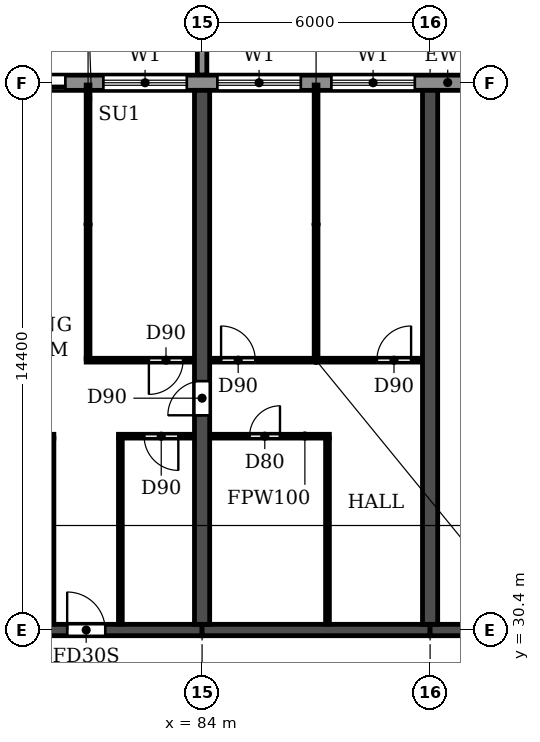
"""IFC4 building model, lengths in metres.
Left out: names, types, materials, properties, quantities, classifications, styles, units other than length and angle.
Written with IfcOpenShell. Run it as: python <this file> out.ifc"""

import sys

from ifc_helpers import new_model, si_unit, direction, frame, frame_2d, origin, place, context, subcontext, project, spatial, polyline, rectangle, outline, extrude, source, transform, mapped, element, fill, save


model = new_model("IFC4")
c1 = context("Model", 3, precision=1e-05, world=origin(), true_north=direction((0.0, 1.0)))
c2 = subcontext(c1, "Body", "Model", "MODEL_VIEW")
j1 = project(units=[si_unit("LENGTHUNIT", "METRE"), si_unit("PLANEANGLEUNIT", "RADIAN")], contexts=[c1])
p1 = place(None, origin())
s1 = spatial("IfcSite", under=j1, at=p1, CompositionType="ELEMENT")
p2 = place(p1, origin())
s2 = spatial("IfcBuilding", under=s1, at=p2, CompositionType="ELEMENT")
p3 = place(p2, frame((0.0, 0.0, 63.0)))
s3 = spatial("IfcBuildingStorey", under=s2, at=p3, CompositionType="ELEMENT", Elevation=63.0)
p4 = place(p3, frame((84.0, 30.55, 0.0), z_axis=(0.0, 0.0, 1.0), x_axis=(0.0, 1.0, 0.0)))
e1 = element("IfcWall", 1, at=p4, inside=s3, PredefinedType="SHEAR", context=c2, shape_type="SweptSolid", body=[
    extrude(rectangle(XDim=14.05, YDim=0.4, at=frame_2d((7.025, 0.0))), origin(), (0.0, 0.0, 1.0), 2.95),
])
p5 = place(p4, frame((5.5, 0.0, 0.0)))
e2 = element("IfcOpeningElement", 2, at=p5, cuts=e1, PredefinedType="OPENING", context=c2, shape_type="SweptSolid", body=[
    extrude(rectangle(XDim=0.9, YDim=2.1, at=frame_2d((0.45, 1.05))), frame((0.0, 0.21, 0.0), z_axis=(0.0, -1.0, 0.0), x_axis=(1.0, 0.0, 0.0)), (0.0, 0.0, 1.0), 0.42),
])
p6 = place(p3, frame((90.0, 30.55, 0.0), z_axis=(0.0, 0.0, 1.0), x_axis=(0.0, 1.0, 0.0)))
e3 = element("IfcWall", 3, at=p6, inside=s3, PredefinedType="SHEAR", context=c2, shape_type="SweptSolid", body=[
    extrude(rectangle(XDim=14.05, YDim=0.4, at=frame_2d((7.025, 0.0))), origin(), (0.0, 0.0, 1.0), 2.95),
])
p7 = place(p3, frame((78.0, 30.4, 0.0), z_axis=(0.0, 0.0, 1.0), x_axis=(1.0, 0.0, 0.0)))
e4 = element("IfcWall", 4, at=p7, inside=s3, PredefinedType="SHEAR", context=c2, shape_type="SweptSolid", body=[
    extrude(rectangle(XDim=6.0, YDim=0.3, at=frame_2d((3.0, 0.0))), origin(), (0.0, 0.0, 1.0), 2.35),
])
p8 = place(p7, frame((2.45, 0.0, 0.0)))
e5 = element("IfcOpeningElement", 5, at=p8, cuts=e4, PredefinedType="OPENING", context=c2, shape_type="SweptSolid", body=[
    extrude(rectangle(XDim=1.0, YDim=2.1, at=frame_2d((0.5, 1.05))), frame((0.0, 0.16, 0.0), z_axis=(0.0, -1.0, 0.0), x_axis=(1.0, 0.0, 0.0)), (0.0, 0.0, 1.0), 0.32),
])
p9 = place(p3, frame((84.0, 30.4, 0.0), z_axis=(0.0, 0.0, 1.0), x_axis=(1.0, 0.0, 0.0)))
e6 = element("IfcWall", 6, at=p9, inside=s3, PredefinedType="SHEAR", context=c2, shape_type="SweptSolid", body=[
    extrude(rectangle(XDim=6.0, YDim=0.3, at=frame_2d((3.0, 0.0))), origin(), (0.0, 0.0, 1.0), 2.35),
])
p10 = place(p3, frame((90.0, 30.4, 0.0), z_axis=(0.0, 0.0, 1.0), x_axis=(1.0, 0.0, 0.0)))
e7 = element("IfcWall", 7, at=p10, inside=s3, PredefinedType="SHEAR", context=c2, shape_type="SweptSolid", body=[
    extrude(rectangle(XDim=5.8, YDim=0.3, at=frame_2d((2.9, 0.0))), origin(), (0.0, 0.0, 1.0), 2.35),
])
p11 = place(p10, frame((2.5, 0.0, 0.0)))
e8 = element("IfcOpeningElement", 8, at=p11, cuts=e7, PredefinedType="OPENING", context=c2, shape_type="SweptSolid", body=[
    extrude(rectangle(XDim=1.0, YDim=2.1, at=frame_2d((0.5, 1.05))), frame((0.0, 0.16, 0.0), z_axis=(0.0, -1.0, 0.0), x_axis=(1.0, 0.0, 0.0)), (0.0, 0.0, 1.0), 0.32),
])
p12 = place(p3, frame((91.317, 44.8, 0.0), z_axis=(0.0, 0.0, 1.0), x_axis=(-1.0, 0.0, 0.0)))
e9 = element("IfcWall", 9, at=p12, inside=s3, PredefinedType="STANDARD", context=c2, shape_type="SweptSolid", body=[
    extrude(rectangle(XDim=80.634, YDim=0.4, at=frame_2d((40.317, 0.0))), origin(), (0.0, 0.0, 1.0), 2.95),
])
p13 = place(p12, frame((76.717, 0.0, 0.9)))
e10 = element("IfcOpeningElement", 10, at=p13, cuts=e9, PredefinedType="OPENING", context=c2, shape_type="SweptSolid", body=[
    extrude(rectangle(XDim=2.2, YDim=1.5, at=frame_2d((1.1, 0.75))), frame((0.0, 0.21, 0.0), z_axis=(0.0, -1.0, 0.0), x_axis=(1.0, 0.0, 0.0)), (0.0, 0.0, 1.0), 0.42),
])
p14 = place(p12, frame((73.917, 0.0, 0.0)))
e11 = element("IfcOpeningElement", 11, at=p14, cuts=e9, PredefinedType="OPENING", context=c2, shape_type="SweptSolid", body=[
    extrude(rectangle(XDim=1.8, YDim=2.4, at=frame_2d((0.9, 1.2))), frame((0.0, 0.21, 0.0), z_axis=(0.0, -1.0, 0.0), x_axis=(1.0, 0.0, 0.0)), (0.0, 0.0, 1.0), 0.42),
])
p15 = place(p12, frame((70.717, 0.0, 0.9)))
e12 = element("IfcOpeningElement", 12, at=p15, cuts=e9, PredefinedType="OPENING", context=c2, shape_type="SweptSolid", body=[
    extrude(rectangle(XDim=2.2, YDim=1.5, at=frame_2d((1.1, 0.75))), frame((0.0, 0.21, 0.0), z_axis=(0.0, -1.0, 0.0), x_axis=(1.0, 0.0, 0.0)), (0.0, 0.0, 1.0), 0.42),
])
p16 = place(p12, frame((67.917, 0.0, 0.0)))
e13 = element("IfcOpeningElement", 13, at=p16, cuts=e9, PredefinedType="OPENING", context=c2, shape_type="SweptSolid", body=[
    extrude(rectangle(XDim=1.8, YDim=2.4, at=frame_2d((0.9, 1.2))), frame((0.0, 0.21, 0.0), z_axis=(0.0, -1.0, 0.0), x_axis=(1.0, 0.0, 0.0)), (0.0, 0.0, 1.0), 0.42),
])
p17 = place(p12, frame((64.717, 0.0, 0.9)))
e14 = element("IfcOpeningElement", 14, at=p17, cuts=e9, PredefinedType="OPENING", context=c2, shape_type="SweptSolid", body=[
    extrude(rectangle(XDim=2.2, YDim=1.5, at=frame_2d((1.1, 0.75))), frame((0.0, 0.21, 0.0), z_axis=(0.0, -1.0, 0.0), x_axis=(1.0, 0.0, 0.0)), (0.0, 0.0, 1.0), 0.42),
])
p18 = place(p12, frame((61.917, 0.0, 0.0)))
e15 = element("IfcOpeningElement", 15, at=p18, cuts=e9, PredefinedType="OPENING", context=c2, shape_type="SweptSolid", body=[
    extrude(rectangle(XDim=1.8, YDim=2.4, at=frame_2d((0.9, 1.2))), frame((0.0, 0.21, 0.0), z_axis=(0.0, -1.0, 0.0), x_axis=(1.0, 0.0, 0.0)), (0.0, 0.0, 1.0), 0.42),
])
p19 = place(p12, frame((58.717, 0.0, 0.9)))
e16 = element("IfcOpeningElement", 16, at=p19, cuts=e9, PredefinedType="OPENING", context=c2, shape_type="SweptSolid", body=[
    extrude(rectangle(XDim=2.2, YDim=1.5, at=frame_2d((1.1, 0.75))), frame((0.0, 0.21, 0.0), z_axis=(0.0, -1.0, 0.0), x_axis=(1.0, 0.0, 0.0)), (0.0, 0.0, 1.0), 0.42),
])
p20 = place(p12, frame((55.717, 0.0, 0.9)))
e17 = element("IfcOpeningElement", 17, at=p20, cuts=e9, PredefinedType="OPENING", context=c2, shape_type="SweptSolid", body=[
    extrude(rectangle(XDim=2.2, YDim=1.5, at=frame_2d((1.1, 0.75))), frame((0.0, 0.21, 0.0), z_axis=(0.0, -1.0, 0.0), x_axis=(1.0, 0.0, 0.0)), (0.0, 0.0, 1.0), 0.42),
])
p21 = place(p12, frame((52.917, 0.0, 0.0)))
e18 = element("IfcOpeningElement", 18, at=p21, cuts=e9, PredefinedType="OPENING", context=c2, shape_type="SweptSolid", body=[
    extrude(rectangle(XDim=1.8, YDim=2.4, at=frame_2d((0.9, 1.2))), frame((0.0, 0.21, 0.0), z_axis=(0.0, -1.0, 0.0), x_axis=(1.0, 0.0, 0.0)), (0.0, 0.0, 1.0), 0.42),
])
p22 = place(p12, frame((49.717, 0.0, 0.9)))
e19 = element("IfcOpeningElement", 19, at=p22, cuts=e9, PredefinedType="OPENING", context=c2, shape_type="SweptSolid", body=[
    extrude(rectangle(XDim=2.2, YDim=1.5, at=frame_2d((1.1, 0.75))), frame((0.0, 0.21, 0.0), z_axis=(0.0, -1.0, 0.0), x_axis=(1.0, 0.0, 0.0)), (0.0, 0.0, 1.0), 0.42),
])
p23 = place(p12, frame((46.917, 0.0, 0.0)))
e20 = element("IfcOpeningElement", 20, at=p23, cuts=e9, PredefinedType="OPENING", context=c2, shape_type="SweptSolid", body=[
    extrude(rectangle(XDim=1.8, YDim=2.4, at=frame_2d((0.9, 1.2))), frame((0.0, 0.21, 0.0), z_axis=(0.0, -1.0, 0.0), x_axis=(1.0, 0.0, 0.0)), (0.0, 0.0, 1.0), 0.42),
])
p24 = place(p12, frame((43.717, 0.0, 0.9)))
e21 = element("IfcOpeningElement", 21, at=p24, cuts=e9, PredefinedType="OPENING", context=c2, shape_type="SweptSolid", body=[
    extrude(rectangle(XDim=2.2, YDim=1.5, at=frame_2d((1.1, 0.75))), frame((0.0, 0.21, 0.0), z_axis=(0.0, -1.0, 0.0), x_axis=(1.0, 0.0, 0.0)), (0.0, 0.0, 1.0), 0.42),
])
p25 = place(p12, frame((40.717, 0.0, 0.9)))
e22 = element("IfcOpeningElement", 22, at=p25, cuts=e9, PredefinedType="OPENING", context=c2, shape_type="SweptSolid", body=[
    extrude(rectangle(XDim=2.2, YDim=1.5, at=frame_2d((1.1, 0.75))), frame((0.0, 0.21, 0.0), z_axis=(0.0, -1.0, 0.0), x_axis=(1.0, 0.0, 0.0)), (0.0, 0.0, 1.0), 0.42),
])
p26 = place(p12, frame((37.717, 0.0, 0.9)))
e23 = element("IfcOpeningElement", 23, at=p26, cuts=e9, PredefinedType="OPENING", context=c2, shape_type="SweptSolid", body=[
    extrude(rectangle(XDim=2.2, YDim=1.5, at=frame_2d((1.1, 0.75))), frame((0.0, 0.21, 0.0), z_axis=(0.0, -1.0, 0.0), x_axis=(1.0, 0.0, 0.0)), (0.0, 0.0, 1.0), 0.42),
])
p27 = place(p12, frame((34.717, 0.0, 0.9)))
e24 = element("IfcOpeningElement", 24, at=p27, cuts=e9, PredefinedType="OPENING", context=c2, shape_type="SweptSolid", body=[
    extrude(rectangle(XDim=2.2, YDim=1.5, at=frame_2d((1.1, 0.75))), frame((0.0, 0.21, 0.0), z_axis=(0.0, -1.0, 0.0), x_axis=(1.0, 0.0, 0.0)), (0.0, 0.0, 1.0), 0.42),
])
p28 = place(p12, frame((31.917, 0.0, 0.0)))
e25 = element("IfcOpeningElement", 25, at=p28, cuts=e9, PredefinedType="OPENING", context=c2, shape_type="SweptSolid", body=[
    extrude(rectangle(XDim=1.8, YDim=2.4, at=frame_2d((0.9, 1.2))), frame((0.0, 0.21, 0.0), z_axis=(0.0, -1.0, 0.0), x_axis=(1.0, 0.0, 0.0)), (0.0, 0.0, 1.0), 0.42),
])
p29 = place(p12, frame((28.917, 0.0, 0.0)))
e26 = element("IfcOpeningElement", 26, at=p29, cuts=e9, PredefinedType="OPENING", context=c2, shape_type="SweptSolid", body=[
    extrude(rectangle(XDim=1.8, YDim=2.4, at=frame_2d((0.9, 1.2))), frame((0.0, 0.21, 0.0), z_axis=(0.0, -1.0, 0.0), x_axis=(1.0, 0.0, 0.0)), (0.0, 0.0, 1.0), 0.42),
])
p30 = place(p12, frame((25.717, 0.0, 0.9)))
e27 = element("IfcOpeningElement", 27, at=p30, cuts=e9, PredefinedType="OPENING", context=c2, shape_type="SweptSolid", body=[
    extrude(rectangle(XDim=2.2, YDim=1.5, at=frame_2d((1.1, 0.75))), frame((0.0, 0.21, 0.0), z_axis=(0.0, -1.0, 0.0), x_axis=(1.0, 0.0, 0.0)), (0.0, 0.0, 1.0), 0.42),
])
p31 = place(p12, frame((22.917, 0.0, 0.0)))
e28 = element("IfcOpeningElement", 28, at=p31, cuts=e9, PredefinedType="OPENING", context=c2, shape_type="SweptSolid", body=[
    extrude(rectangle(XDim=1.8, YDim=2.4, at=frame_2d((0.9, 1.2))), frame((0.0, 0.21, 0.0), z_axis=(0.0, -1.0, 0.0), x_axis=(1.0, 0.0, 0.0)), (0.0, 0.0, 1.0), 0.42),
])
p32 = place(p12, frame((19.717, 0.0, 0.9)))
e29 = element("IfcOpeningElement", 29, at=p32, cuts=e9, PredefinedType="OPENING", context=c2, shape_type="SweptSolid", body=[
    extrude(rectangle(XDim=2.2, YDim=1.5, at=frame_2d((1.1, 0.75))), frame((0.0, 0.21, 0.0), z_axis=(0.0, -1.0, 0.0), x_axis=(1.0, 0.0, 0.0)), (0.0, 0.0, 1.0), 0.42),
])
p33 = place(p12, frame((16.917, 0.0, 0.0)))
e30 = element("IfcOpeningElement", 30, at=p33, cuts=e9, PredefinedType="OPENING", context=c2, shape_type="SweptSolid", body=[
    extrude(rectangle(XDim=1.8, YDim=2.4, at=frame_2d((0.9, 1.2))), frame((0.0, 0.21, 0.0), z_axis=(0.0, -1.0, 0.0), x_axis=(1.0, 0.0, 0.0)), (0.0, 0.0, 1.0), 0.42),
])
p34 = place(p12, frame((13.717, 0.0, 0.9)))
e31 = element("IfcOpeningElement", 31, at=p34, cuts=e9, PredefinedType="OPENING", context=c2, shape_type="SweptSolid", body=[
    extrude(rectangle(XDim=2.2, YDim=1.5, at=frame_2d((1.1, 0.75))), frame((0.0, 0.21, 0.0), z_axis=(0.0, -1.0, 0.0), x_axis=(1.0, 0.0, 0.0)), (0.0, 0.0, 1.0), 0.42),
])
p35 = place(p12, frame((10.917, 0.0, 0.0)))
e32 = element("IfcOpeningElement", 32, at=p35, cuts=e9, PredefinedType="OPENING", context=c2, shape_type="SweptSolid", body=[
    extrude(rectangle(XDim=1.8, YDim=2.4, at=frame_2d((0.9, 1.2))), frame((0.0, 0.21, 0.0), z_axis=(0.0, -1.0, 0.0), x_axis=(1.0, 0.0, 0.0)), (0.0, 0.0, 1.0), 0.42),
])
p36 = place(p12, frame((7.717, 0.0, 0.9)))
e33 = element("IfcOpeningElement", 33, at=p36, cuts=e9, PredefinedType="OPENING", context=c2, shape_type="SweptSolid", body=[
    extrude(rectangle(XDim=2.2, YDim=1.5, at=frame_2d((1.1, 0.75))), frame((0.0, 0.21, 0.0), z_axis=(0.0, -1.0, 0.0), x_axis=(1.0, 0.0, 0.0)), (0.0, 0.0, 1.0), 0.42),
])
p37 = place(p12, frame((4.717, 0.0, 0.9)))
e34 = element("IfcOpeningElement", 34, at=p37, cuts=e9, PredefinedType="OPENING", context=c2, shape_type="SweptSolid", body=[
    extrude(rectangle(XDim=2.2, YDim=1.5, at=frame_2d((1.1, 0.75))), frame((0.0, 0.21, 0.0), z_axis=(0.0, -1.0, 0.0), x_axis=(1.0, 0.0, 0.0)), (0.0, 0.0, 1.0), 0.42),
])
p38 = place(p12, frame((1.717, 0.0, 0.9)))
e35 = element("IfcOpeningElement", 35, at=p38, cuts=e9, PredefinedType="OPENING", context=c2, shape_type="SweptSolid", body=[
    extrude(rectangle(XDim=2.2, YDim=1.5, at=frame_2d((1.1, 0.75))), frame((0.0, 0.21, 0.0), z_axis=(0.0, -1.0, 0.0), x_axis=(1.0, 0.0, 0.0)), (0.0, 0.0, 1.0), 0.42),
])
m1 = source(origin(), c2, "Body", "SweptSolid", [
    extrude(outline(polyline([(0.0, 0.0), (0.25, 0.0), (0.25, 3.1), (0.0, 3.1), (0.0, 0.0)])), origin(), (0.0, 0.0, 1.0), 3.1),
])
p39 = place(p3, frame((83.875, 45.0, 0.0)))
e36 = element("IfcWall", 36, at=p39, inside=s3, PredefinedType="STANDARD", context=c2, shape_type="MappedRepresentation", body=[
    mapped(m1, transform((0.0, 0.0, 0.0))),
])
p40 = place(p3, frame((78.21, 35.5, 0.0), z_axis=(0.0, 0.0, 1.0), x_axis=(1.0, 0.0, 0.0)))
e37 = element("IfcWall", 37, at=p40, inside=s3, PredefinedType="PARTITIONING", context=c2, shape_type="SweptSolid", body=[
    extrude(rectangle(XDim=1.89, YDim=0.1, at=frame_2d((0.945, 0.0))), origin(), (0.0, 0.0, 1.0), 2.95),
])
p41 = place(p40, frame((0.415, 0.0, 0.0)))
e38 = element("IfcOpeningElement", 38, at=p41, cuts=e37, PredefinedType="OPENING", context=c2, shape_type="SweptSolid", body=[
    extrude(rectangle(XDim=0.8, YDim=2.1, at=frame_2d((0.4, 1.05))), frame((0.0, 0.06, 0.0), z_axis=(0.0, -1.0, 0.0), x_axis=(1.0, 0.0, 0.0)), (0.0, 0.0, 1.0), 0.12),
])
p42 = place(p3, frame((81.8, 35.5, 0.0), z_axis=(0.0, 0.0, 1.0), x_axis=(1.0, 0.0, 0.0)))
e39 = element("IfcWall", 39, at=p42, inside=s3, PredefinedType="PARTITIONING", context=c2, shape_type="SweptSolid", body=[
    extrude(rectangle(XDim=1.99, YDim=0.1, at=frame_2d((0.995, 0.0))), origin(), (0.0, 0.0, 1.0), 2.95),
])
p43 = place(p42, frame((0.675, 0.0, 0.0)))
e40 = element("IfcOpeningElement", 40, at=p43, cuts=e39, PredefinedType="OPENING", context=c2, shape_type="SweptSolid", body=[
    extrude(rectangle(XDim=0.9, YDim=2.1, at=frame_2d((0.45, 1.05))), frame((0.0, 0.06, 0.0), z_axis=(0.0, -1.0, 0.0), x_axis=(1.0, 0.0, 0.0)), (0.0, 0.0, 1.0), 0.12),
])
p44 = place(p3, frame((84.21, 35.5, 0.0), z_axis=(0.0, 0.0, 1.0), x_axis=(1.0, 0.0, 0.0)))
e41 = element("IfcWall", 41, at=p44, inside=s3, PredefinedType="PARTITIONING", context=c2, shape_type="SweptSolid", body=[
    extrude(rectangle(XDim=3.14, YDim=0.1, at=frame_2d((1.57, 0.0))), origin(), (0.0, 0.0, 1.0), 2.95),
])
p45 = place(p44, frame((1.04, 0.0, 0.0)))
e42 = element("IfcOpeningElement", 42, at=p45, cuts=e41, PredefinedType="OPENING", context=c2, shape_type="SweptSolid", body=[
    extrude(rectangle(XDim=0.8, YDim=2.1, at=frame_2d((0.4, 1.05))), frame((0.0, 0.06, 0.0), z_axis=(0.0, -1.0, 0.0), x_axis=(1.0, 0.0, 0.0)), (0.0, 0.0, 1.0), 0.12),
])
p46 = place(p3, frame((80.95, 37.5, 0.0), z_axis=(0.0, 0.0, 1.0), x_axis=(1.0, 0.0, 0.0)))
e43 = element("IfcWall", 43, at=p46, inside=s3, PredefinedType="PARTITIONING", context=c2, shape_type="SweptSolid", body=[
    extrude(rectangle(XDim=2.84, YDim=0.1, at=frame_2d((1.42, 0.0))), origin(), (0.0, 0.0, 1.0), 2.95),
])
p47 = place(p46, frame((1.65, 0.0, 0.0)))
e44 = element("IfcOpeningElement", 44, at=p47, cuts=e43, PredefinedType="OPENING", context=c2, shape_type="SweptSolid", body=[
    extrude(rectangle(XDim=0.9, YDim=2.1, at=frame_2d((0.45, 1.05))), frame((0.0, 0.06, 0.0), z_axis=(0.0, -1.0, 0.0), x_axis=(1.0, 0.0, 0.0)), (0.0, 0.0, 1.0), 0.12),
])
p48 = place(p3, frame((84.21, 37.5, 0.0), z_axis=(0.0, 0.0, 1.0), x_axis=(1.0, 0.0, 0.0)))
e45 = element("IfcWall", 45, at=p48, inside=s3, PredefinedType="PARTITIONING", context=c2, shape_type="SweptSolid", body=[
    extrude(rectangle(XDim=5.58, YDim=0.1, at=frame_2d((2.79, 0.0))), origin(), (0.0, 0.0, 1.0), 2.95),
])
p49 = place(p48, frame((0.29, 0.0, 0.0)))
e46 = element("IfcOpeningElement", 46, at=p49, cuts=e45, PredefinedType="OPENING", context=c2, shape_type="SweptSolid", body=[
    extrude(rectangle(XDim=0.9, YDim=2.1, at=frame_2d((0.45, 1.05))), frame((0.0, 0.06, 0.0), z_axis=(0.0, -1.0, 0.0), x_axis=(1.0, 0.0, 0.0)), (0.0, 0.0, 1.0), 0.12),
])
p50 = place(p48, frame((4.39, 0.0, 0.0)))
e47 = element("IfcOpeningElement", 47, at=p50, cuts=e45, PredefinedType="OPENING", context=c2, shape_type="SweptSolid", body=[
    extrude(rectangle(XDim=0.9, YDim=2.1, at=frame_2d((0.45, 1.05))), frame((0.0, 0.06, 0.0), z_axis=(0.0, -1.0, 0.0), x_axis=(1.0, 0.0, 0.0)), (0.0, 0.0, 1.0), 0.12),
])
p51 = place(p3, frame((80.05, 30.56, 0.0), z_axis=(0.0, 0.0, 1.0), x_axis=(0.0, 1.0, 0.0)))
e48 = element("IfcWall", 48, at=p51, inside=s3, PredefinedType="PARTITIONING", context=c2, shape_type="SweptSolid", body=[
    extrude(rectangle(XDim=4.89, YDim=0.1, at=frame_2d((2.445, 0.0))), origin(), (0.0, 0.0, 1.0), 2.95),
])
p52 = place(p3, frame((81.0, 37.55, 0.0), z_axis=(0.0, 0.0, 1.0), x_axis=(0.0, 1.0, 0.0)))
e49 = element("IfcWall", 49, at=p52, inside=s3, PredefinedType="PARTITIONING", context=c2, shape_type="SweptSolid", body=[
    extrude(rectangle(XDim=7.19, YDim=0.1, at=frame_2d((3.595, 0.0))), origin(), (0.0, 0.0, 1.0), 2.95),
])
p53 = place(p3, frame((81.85, 30.56, 0.0), z_axis=(0.0, 0.0, 1.0), x_axis=(0.0, 1.0, 0.0)))
e50 = element("IfcWall", 50, at=p53, inside=s3, PredefinedType="PARTITIONING", context=c2, shape_type="SweptSolid", body=[
    extrude(rectangle(XDim=4.89, YDim=0.1, at=frame_2d((2.445, 0.0))), origin(), (0.0, 0.0, 1.0), 2.95),
])
p54 = place(p3, frame((87.0, 37.55, 0.0), z_axis=(0.0, 0.0, 1.0), x_axis=(0.0, 1.0, 0.0)))
e51 = element("IfcWall", 51, at=p54, inside=s3, PredefinedType="PARTITIONING", context=c2, shape_type="SweptSolid", body=[
    extrude(rectangle(XDim=7.19, YDim=0.1, at=frame_2d((3.595, 0.0))), origin(), (0.0, 0.0, 1.0), 2.95),
])
p55 = place(p3, frame((87.3, 30.56, 0.0), z_axis=(0.0, 0.0, 1.0), x_axis=(0.0, 1.0, 0.0)))
e52 = element("IfcWall", 52, at=p55, inside=s3, PredefinedType="PARTITIONING", context=c2, shape_type="SweptSolid", body=[
    extrude(rectangle(XDim=4.89, YDim=0.1, at=frame_2d((2.445, 0.0))), origin(), (0.0, 0.0, 1.0), 2.95),
])
p56 = place(p35, origin())
e53 = element("IfcDoor", 53, at=p56, inside=s3, OperationType="DOUBLE_DOOR_SLIDING", PredefinedType="DOOR", context=c2, shape_type="SweptSolid", body=[
    extrude(rectangle(XDim=1.8, YDim=2.4, at=frame_2d((0.9, 1.2))), frame((0.0, 0.025, 0.0), z_axis=(0.0, -1.0, 0.0), x_axis=(1.0, 0.0, 0.0)), (0.0, 0.0, 1.0), 0.05),
])
fill(e32, e53)
p57 = place(p36, origin())
e54 = element("IfcWindow", 54, at=p57, inside=s3, PartitioningType="DOUBLE_PANEL_HORIZONTAL", PredefinedType="WINDOW", context=c2, shape_type="SweptSolid", body=[
    extrude(rectangle(XDim=2.2, YDim=1.5, at=frame_2d((1.1, 0.75))), frame((0.0, 0.03, 0.0), z_axis=(0.0, -1.0, 0.0), x_axis=(1.0, 0.0, 0.0)), (0.0, 0.0, 1.0), 0.06),
])
fill(e33, e54)
p58 = place(p37, origin())
e55 = element("IfcWindow", 55, at=p58, inside=s3, PartitioningType="DOUBLE_PANEL_HORIZONTAL", PredefinedType="WINDOW", context=c2, shape_type="SweptSolid", body=[
    extrude(rectangle(XDim=2.2, YDim=1.5, at=frame_2d((1.1, 0.75))), frame((0.0, 0.03, 0.0), z_axis=(0.0, -1.0, 0.0), x_axis=(1.0, 0.0, 0.0)), (0.0, 0.0, 1.0), 0.06),
])
fill(e34, e55)
p59 = place(p38, origin())
e56 = element("IfcWindow", 56, at=p59, inside=s3, PartitioningType="DOUBLE_PANEL_HORIZONTAL", PredefinedType="WINDOW", context=c2, shape_type="SweptSolid", body=[
    extrude(rectangle(XDim=2.2, YDim=1.5, at=frame_2d((1.1, 0.75))), frame((0.0, 0.03, 0.0), z_axis=(0.0, -1.0, 0.0), x_axis=(1.0, 0.0, 0.0)), (0.0, 0.0, 1.0), 0.06),
])
fill(e35, e56)
p60 = place(p49, origin())
e57 = element("IfcDoor", 57, at=p60, inside=s3, OperationType="SINGLE_SWING_LEFT", PredefinedType="DOOR", context=c2, shape_type="SweptSolid", body=[
    extrude(rectangle(XDim=0.9, YDim=2.1, at=frame_2d((0.45, 1.05))), frame((0.0, 0.025, 0.0), z_axis=(0.0, -1.0, 0.0), x_axis=(1.0, 0.0, 0.0)), (0.0, 0.0, 1.0), 0.05),
])
fill(e46, e57)
p61 = place(p45, origin())
e58 = element("IfcDoor", 58, at=p61, inside=s3, OperationType="SINGLE_SWING_RIGHT", PredefinedType="DOOR", context=c2, shape_type="SweptSolid", body=[
    extrude(rectangle(XDim=0.8, YDim=2.1, at=frame_2d((0.4, 1.05))), frame((0.0, 0.025, 0.0), z_axis=(0.0, -1.0, 0.0), x_axis=(1.0, 0.0, 0.0)), (0.0, 0.0, 1.0), 0.05),
])
fill(e42, e58)
p62 = place(p50, origin())
e59 = element("IfcDoor", 59, at=p62, inside=s3, OperationType="SINGLE_SWING_RIGHT", PredefinedType="DOOR", context=c2, shape_type="SweptSolid", body=[
    extrude(rectangle(XDim=0.9, YDim=2.1, at=frame_2d((0.45, 1.05))), frame((0.0, 0.025, 0.0), z_axis=(0.0, -1.0, 0.0), x_axis=(1.0, 0.0, 0.0)), (0.0, 0.0, 1.0), 0.05),
])
fill(e47, e59)
p63 = place(p8, origin())
e60 = element("IfcDoor", 60, at=p63, inside=s3, OperationType="SINGLE_SWING_LEFT", PredefinedType="DOOR", context=c2, shape_type="SweptSolid", body=[
    extrude(rectangle(XDim=1.0, YDim=2.1, at=frame_2d((0.5, 1.05))), frame((0.0, 0.025, 0.0), z_axis=(0.0, -1.0, 0.0), x_axis=(1.0, 0.0, 0.0)), (0.0, 0.0, 1.0), 0.05),
])
fill(e5, e60)
p64 = place(p43, frame((0.9, 0.0, 0.0), z_axis=(0.0, 0.0, 1.0), x_axis=(-1.0, 0.0, 0.0)))
e61 = element("IfcDoor", 61, at=p64, inside=s3, OperationType="SINGLE_SWING_LEFT", PredefinedType="DOOR", context=c2, shape_type="SweptSolid", body=[
    extrude(rectangle(XDim=0.9, YDim=2.1, at=frame_2d((0.45, 1.05))), frame((0.0, 0.025, 0.0), z_axis=(0.0, -1.0, 0.0), x_axis=(1.0, 0.0, 0.0)), (0.0, 0.0, 1.0), 0.05),
])
fill(e40, e61)
p65 = place(p47, frame((0.9, 0.0, 0.0), z_axis=(0.0, 0.0, 1.0), x_axis=(-1.0, 0.0, 0.0)))
e62 = element("IfcDoor", 62, at=p65, inside=s3, OperationType="SINGLE_SWING_RIGHT", PredefinedType="DOOR", context=c2, shape_type="SweptSolid", body=[
    extrude(rectangle(XDim=0.9, YDim=2.1, at=frame_2d((0.45, 1.05))), frame((0.0, 0.025, 0.0), z_axis=(0.0, -1.0, 0.0), x_axis=(1.0, 0.0, 0.0)), (0.0, 0.0, 1.0), 0.05),
])
fill(e44, e62)
p66 = place(p5, origin())
e63 = element("IfcDoor", 63, at=p66, inside=s3, OperationType="SINGLE_SWING_LEFT", PredefinedType="DOOR", context=c2, shape_type="SweptSolid", body=[
    extrude(rectangle(XDim=0.9, YDim=2.1, at=frame_2d((0.45, 1.05))), frame((0.0, 0.025, 0.0), z_axis=(0.0, -1.0, 0.0), x_axis=(1.0, 0.0, 0.0)), (0.0, 0.0, 1.0), 0.05),
])
fill(e2, e63)
save(model, sys.argv[1])
